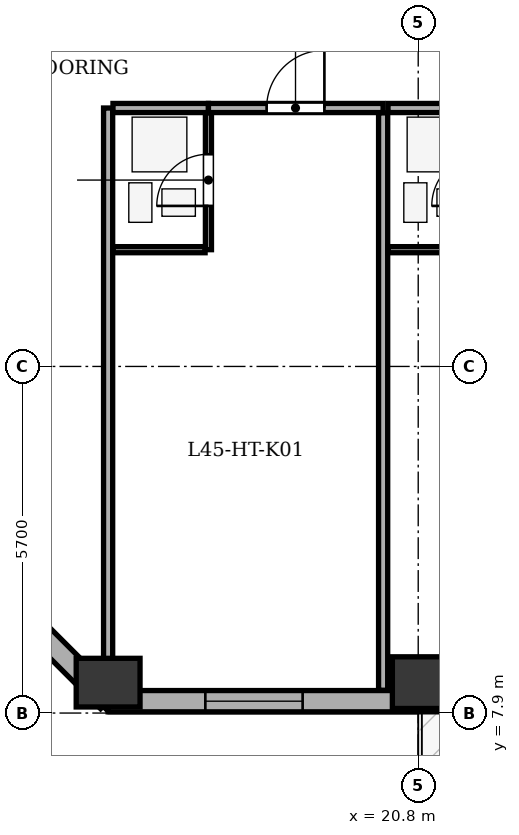
"""IFC4 building model, lengths in metres.
Left out: names, types, materials, properties, quantities, classifications, styles, units other than length and angle.
Written with IfcOpenShell. Run it as: python <this file> out.ifc"""

import sys

from ifc_helpers import new_model, si_unit, direction, frame, frame_2d, origin, origin_2d, place, context, subcontext, project, spatial, rectangle, extrude, element, fill, save


model = new_model("IFC4")
c1 = context("Model", 3, precision=1e-05, world=origin(), true_north=direction((0.0, 1.0)))
c2 = subcontext(c1, "Body", "Model", "MODEL_VIEW")
j1 = project(units=[si_unit("LENGTHUNIT", "METRE"), si_unit("PLANEANGLEUNIT", "RADIAN")], contexts=[c1])
p1 = place(None, origin())
s1 = spatial("IfcSite", under=j1, at=p1, CompositionType="ELEMENT")
p2 = place(p1, origin())
s2 = spatial("IfcBuilding", under=s1, at=p2, CompositionType="ELEMENT")
p3 = place(p2, frame((0.0, 0.0, 176.3)))
s3 = spatial("IfcBuildingStorey", under=s2, at=p3, CompositionType="ELEMENT", Elevation=176.3)
p4 = place(p3, frame((15.7, 8.4, 0.0), z_axis=(0.0, 0.0, 1.0), x_axis=(1.0, 0.0, 0.0)))
e1 = element("IfcColumn", 1, at=p4, inside=s3, PredefinedType="COLUMN", context=c2, shape_type="SweptSolid", body=[
    extrude(rectangle(XDim=0.8, YDim=1.05, at=origin_2d()), origin(), (0.0, 0.0, 1.0), 3.5),
])
p5 = place(p3, frame((20.8, 8.4, 0.0), z_axis=(0.0, 0.0, 1.0), x_axis=(1.0, 0.0, 0.0)))
e2 = element("IfcColumn", 2, at=p5, inside=s3, PredefinedType="COLUMN", context=c2, shape_type="SweptSolid", body=[
    extrude(rectangle(XDim=0.85, YDim=0.85, at=origin_2d()), origin(), (0.0, 0.0, 1.0), 3.5),
])
p6 = place(p3, frame((50.7, 8.095, 0.0), z_axis=(0.0, 0.0, 1.0), x_axis=(-1.0, 0.0, 0.0)))
e3 = element("IfcWall", 3, at=p6, inside=s3, PredefinedType="STANDARD", context=c2, shape_type="SweptSolid", body=[
    extrude(rectangle(XDim=35.0, YDim=0.35, at=frame_2d((17.5, 0.0))), origin(), (0.0, 0.0, 1.0), 2.785),
])
p7 = place(p6, frame((26.0, 0.0, 0.0)))
e4 = element("IfcOpeningElement", 4, at=p7, cuts=e3, PredefinedType="OPENING", context=c2, shape_type="SweptSolid", body=[
    extrude(rectangle(XDim=1.0, YDim=2.02, at=frame_2d((0.5, 1.01))), frame((0.0, 0.185, 0.0), z_axis=(0.0, -1.0, 0.0), x_axis=(1.0, 0.0, 0.0)), (0.0, 0.0, 1.0), 0.37),
])
p8 = place(p6, frame((1.763, 0.0, 0.75)))
e5 = element("IfcOpeningElement", 5, at=p8, cuts=e3, PredefinedType="OPENING", context=c2, shape_type="SweptSolid", body=[
    extrude(rectangle(XDim=1.6, YDim=1.75, at=frame_2d((0.8, 0.875))), frame((0.0, 0.185, 0.0), z_axis=(0.0, -1.0, 0.0), x_axis=(1.0, 0.0, 0.0)), (0.0, 0.0, 1.0), 0.37),
])
p9 = place(p6, frame((6.764, 0.0, 0.75)))
e6 = element("IfcOpeningElement", 6, at=p9, cuts=e3, PredefinedType="OPENING", context=c2, shape_type="SweptSolid", body=[
    extrude(rectangle(XDim=1.6, YDim=1.75, at=frame_2d((0.8, 0.875))), frame((0.0, 0.185, 0.0), z_axis=(0.0, -1.0, 0.0), x_axis=(1.0, 0.0, 0.0)), (0.0, 0.0, 1.0), 0.37),
])
p10 = place(p6, frame((12.001, 0.0, 0.75)))
e7 = element("IfcOpeningElement", 7, at=p10, cuts=e3, PredefinedType="OPENING", context=c2, shape_type="SweptSolid", body=[
    extrude(rectangle(XDim=1.6, YDim=1.75, at=frame_2d((0.8, 0.875))), frame((0.0, 0.185, 0.0), z_axis=(0.0, -1.0, 0.0), x_axis=(1.0, 0.0, 0.0)), (0.0, 0.0, 1.0), 0.37),
])
p11 = place(p6, frame((17.467, 0.0, 0.75)))
e8 = element("IfcOpeningElement", 8, at=p11, cuts=e3, PredefinedType="OPENING", context=c2, shape_type="SweptSolid", body=[
    extrude(rectangle(XDim=1.6, YDim=1.75, at=frame_2d((0.8, 0.875))), frame((0.0, 0.185, 0.0), z_axis=(0.0, -1.0, 0.0), x_axis=(1.0, 0.0, 0.0)), (0.0, 0.0, 1.0), 0.37),
])
p12 = place(p6, frame((31.801, 0.0, 0.75)))
e9 = element("IfcOpeningElement", 9, at=p12, cuts=e3, PredefinedType="OPENING", context=c2, shape_type="SweptSolid", body=[
    extrude(rectangle(XDim=1.6, YDim=1.75, at=frame_2d((0.8, 0.875))), frame((0.0, 0.185, 0.0), z_axis=(0.0, -1.0, 0.0), x_axis=(1.0, 0.0, 0.0)), (0.0, 0.0, 1.0), 0.37),
])
p13 = place(p6, frame((23.914, 0.0, 0.75)))
e10 = element("IfcOpeningElement", 10, at=p13, cuts=e3, PredefinedType="OPENING", context=c2, shape_type="SweptSolid", body=[
    extrude(rectangle(XDim=0.75, YDim=1.45, at=frame_2d((0.375, 0.725))), frame((0.0, 0.185, 0.0), z_axis=(0.0, -1.0, 0.0), x_axis=(1.0, 0.0, 0.0)), (0.0, 0.0, 1.0), 0.37),
])
p14 = place(p3, frame((15.7, 8.095, 0.0), z_axis=(0.0, 0.0, 1.0), x_axis=(-0.707106781187, 0.707106781187, 0.0)))
e11 = element("IfcWall", 11, at=p14, inside=s3, PredefinedType="STANDARD", context=c2, shape_type="SweptSolid", body=[
    extrude(rectangle(XDim=6.795, YDim=0.35, at=frame_2d((3.397, 0.0))), origin(), (0.0, 0.0, 1.0), 2.785),
])
p15 = place(p14, frame((2.698, 0.0, 0.75)))
e12 = element("IfcOpeningElement", 12, at=p15, cuts=e11, PredefinedType="OPENING", context=c2, shape_type="SweptSolid", body=[
    extrude(rectangle(XDim=1.4, YDim=1.65, at=frame_2d((0.7, 0.825))), frame((0.0, 0.185, 0.0), z_axis=(0.0, -1.0, 0.0), x_axis=(1.0, 0.0, 0.0)), (0.0, 0.0, 1.0), 0.37),
])
p16 = place(p3, frame((15.7, 8.275, 0.0), z_axis=(0.0, 0.0, 1.0), x_axis=(0.0, 1.0, 0.0)))
e13 = element("IfcWall", 13, at=p16, inside=s3, PredefinedType="PARTITIONING", context=c2, shape_type="SweptSolid", body=[
    extrude(rectangle(XDim=9.575, YDim=0.15, at=frame_2d((4.788, 0.0))), origin(), (0.0, 0.0, 1.0), 3.2),
])
p17 = place(p3, frame((15.78, 17.85, 0.0), z_axis=(0.0, 0.0, 1.0), x_axis=(1.0, 0.0, 0.0)))
e14 = element("IfcWall", 14, at=p17, inside=s3, PredefinedType="PARTITIONING", context=c2, shape_type="SweptSolid", body=[
    extrude(rectangle(XDim=1.57, YDim=0.15, at=frame_2d((0.785, 0.0))), origin(), (0.0, 0.0, 1.0), 3.2),
])
p18 = place(p3, frame((17.35, 17.85, 0.0), z_axis=(0.0, 0.0, 1.0), x_axis=(1.0, 0.0, 0.0)))
e15 = element("IfcWall", 15, at=p18, inside=s3, PredefinedType="PARTITIONING", context=c2, shape_type="SweptSolid", body=[
    extrude(rectangle(XDim=2.873, YDim=0.15, at=frame_2d((1.437, 0.0))), origin(), (0.0, 0.0, 1.0), 3.2),
])
p19 = place(p18, frame((0.957, 0.0, 0.0)))
e16 = element("IfcOpeningElement", 16, at=p19, cuts=e15, PredefinedType="OPENING", context=c2, shape_type="SweptSolid", body=[
    extrude(rectangle(XDim=0.95, YDim=2.1, at=frame_2d((0.475, 1.05))), frame((0.0, 0.085, 0.0), z_axis=(0.0, -1.0, 0.0), x_axis=(1.0, 0.0, 0.0)), (0.0, 0.0, 1.0), 0.17),
])
p20 = place(p3, frame((17.35, 15.52, 0.0), z_axis=(0.0, 0.0, 1.0), x_axis=(0.0, 1.0, 0.0)))
e17 = element("IfcWall", 17, at=p20, inside=s3, PredefinedType="PARTITIONING", context=c2, shape_type="SweptSolid", body=[
    extrude(rectangle(XDim=2.25, YDim=0.1, at=frame_2d((1.125, 0.0))), origin(), (0.0, 0.0, 1.0), 3.2),
])
p21 = place(p20, frame((0.72, 0.0, 0.0)))
e18 = element("IfcOpeningElement", 18, at=p21, cuts=e17, PredefinedType="OPENING", context=c2, shape_type="SweptSolid", body=[
    extrude(rectangle(XDim=0.85, YDim=2.05, at=frame_2d((0.425, 1.025))), frame((0.0, 0.06, 0.0), z_axis=(0.0, -1.0, 0.0), x_axis=(1.0, 0.0, 0.0)), (0.0, 0.0, 1.0), 0.12),
])
p22 = place(p3, frame((15.78, 15.52, 0.0), z_axis=(0.0, 0.0, 1.0), x_axis=(1.0, 0.0, 0.0)))
e19 = element("IfcWall", 19, at=p22, inside=s3, PredefinedType="PARTITIONING", context=c2, shape_type="SweptSolid", body=[
    extrude(rectangle(XDim=1.515, YDim=0.1, at=frame_2d((0.757, 0.0))), origin(), (0.0, 0.0, 1.0), 3.2),
])
p23 = place(p3, frame((20.223, 8.275, 0.0), z_axis=(0.0, 0.0, 1.0), x_axis=(0.0, 1.0, 0.0)))
e20 = element("IfcWall", 20, at=p23, inside=s3, PredefinedType="PARTITIONING", context=c2, shape_type="SweptSolid", body=[
    extrude(rectangle(XDim=9.495, YDim=0.15, at=frame_2d((4.748, 0.0))), origin(), (0.0, 0.0, 1.0), 3.2),
])
p24 = place(p3, frame((20.303, 17.85, 0.0), z_axis=(0.0, 0.0, 1.0), x_axis=(1.0, 0.0, 0.0)))
e21 = element("IfcWall", 21, at=p24, inside=s3, PredefinedType="PARTITIONING", context=c2, shape_type="SweptSolid", body=[
    extrude(rectangle(XDim=1.57, YDim=0.15, at=frame_2d((0.785, 0.0))), origin(), (0.0, 0.0, 1.0), 3.2),
])
p25 = place(p3, frame((20.303, 15.52, 0.0), z_axis=(0.0, 0.0, 1.0), x_axis=(1.0, 0.0, 0.0)))
e22 = element("IfcWall", 22, at=p25, inside=s3, PredefinedType="PARTITIONING", context=c2, shape_type="SweptSolid", body=[
    extrude(rectangle(XDim=1.515, YDim=0.1, at=frame_2d((0.758, 0.0))), origin(), (0.0, 0.0, 1.0), 3.2),
])
p26 = place(p12, origin())
e23 = element("IfcWindow", 23, at=p26, inside=s3, PartitioningType="SINGLE_PANEL", PredefinedType="WINDOW", context=c2, shape_type="SweptSolid", body=[
    extrude(rectangle(XDim=1.6, YDim=1.75, at=frame_2d((0.8, 0.875))), frame((0.0, -0.01, 0.0), z_axis=(0.0, -1.0, 0.0), x_axis=(1.0, 0.0, 0.0)), (0.0, 0.0, 1.0), 0.06),
])
fill(e9, e23)
p27 = place(p21, origin())
e24 = element("IfcDoor", 24, at=p27, inside=s3, OperationType="SINGLE_SWING_LEFT", PredefinedType="DOOR", context=c2, shape_type="SweptSolid", body=[
    extrude(rectangle(XDim=0.85, YDim=2.05, at=frame_2d((0.425, 1.025))), frame((0.0, 0.025, 0.0), z_axis=(0.0, -1.0, 0.0), x_axis=(1.0, 0.0, 0.0)), (0.0, 0.0, 1.0), 0.05),
])
fill(e18, e24)
p28 = place(p19, origin())
e25 = element("IfcDoor", 25, at=p28, inside=s3, OperationType="SINGLE_SWING_RIGHT", PredefinedType="DOOR", context=c2, shape_type="SweptSolid", body=[
    extrude(rectangle(XDim=0.95, YDim=2.1, at=frame_2d((0.475, 1.05))), frame((0.0, 0.025, 0.0), z_axis=(0.0, -1.0, 0.0), x_axis=(1.0, 0.0, 0.0)), (0.0, 0.0, 1.0), 0.05),
])
fill(e16, e25)
save(model, sys.argv[1])
